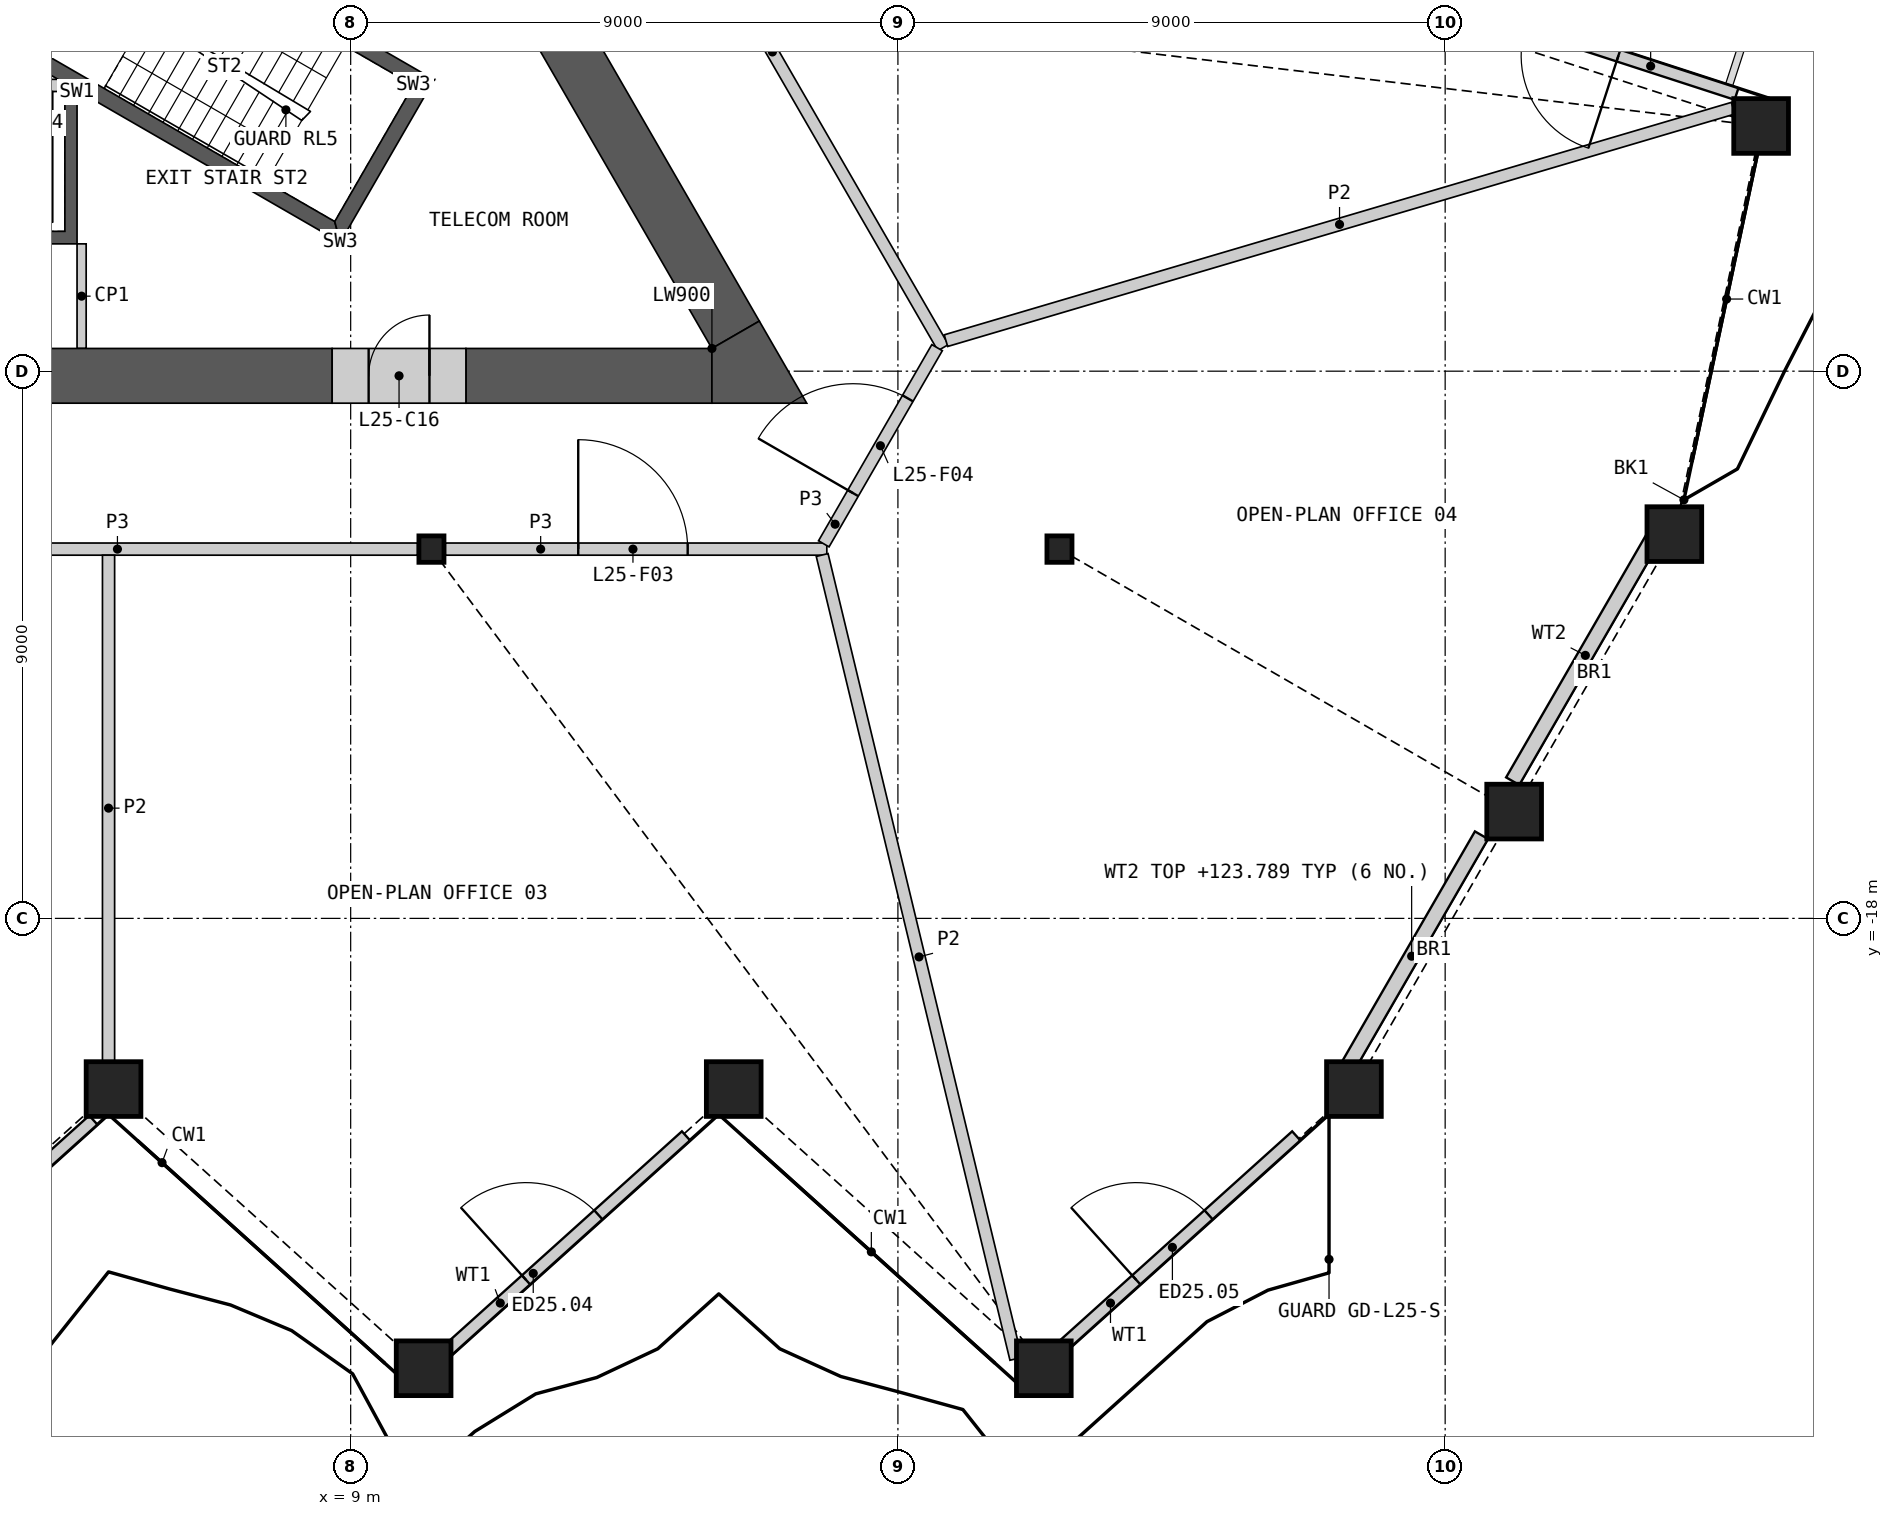
"""IFC4 building model, lengths in metres.
Left out: names, types, materials, properties, quantities, classifications, styles, units other than length and angle.
Written with IfcOpenShell. Run it as: python <this file> out.ifc"""

import sys

from ifc_helpers import new_model, si_unit, direction, frame, frame_2d, origin, origin_2d, place, context, subcontext, project, spatial, polyline, rectangle, hollow_rectangle, i_section, outline, extrude, element, fill, save


model = new_model("IFC4")
c1 = context("Model", 3, precision=1e-05, world=origin(), true_north=direction((0.0, 1.0)))
c2 = subcontext(c1, "Body", "Model", "MODEL_VIEW")
j1 = project(units=[si_unit("LENGTHUNIT", "METRE"), si_unit("PLANEANGLEUNIT", "RADIAN")], contexts=[c1])
p1 = place(None, origin())
s1 = spatial("IfcSite", under=j1, at=p1, CompositionType="ELEMENT")
p2 = place(p1, origin())
s2 = spatial("IfcBuilding", under=s1, at=p2, CompositionType="ELEMENT")
p3 = place(p2, frame((0.0, 0.0, 120.6)))
s3 = spatial("IfcBuildingStorey", under=s2, at=p3, CompositionType="ELEMENT", Elevation=120.6)
for number, where, z_axis, x_axis in (
    (1, (5.1, -20.807, 0.0), (0.0, 0.0, 1.0), (1.0, 0.0, 0.0)),
    (2, (10.2, -25.399, 0.0), (0.0, 0.0, 1.0), (1.0, 0.0, 0.0)),
    (3, (15.3, -20.807, 0.0), (0.0, 0.0, 1.0), (1.0, 0.0, 0.0)),
    (4, (20.4, -25.399, 0.0), (0.0, 0.0, 1.0), (1.0, 0.0, 0.0)),
    (5, (25.5, -20.807, 0.0), (0.0, 0.0, 1.0), (1.0, 0.0, 0.0)),
    (6, (28.135, -16.243, 0.0), (0.0, 0.0, 1.0), (1.0, 0.0, 0.0)),
    (7, (30.769, -11.68, 0.0), (0.0, 0.0, 1.0), (1.0, 0.0, 0.0)),
    (8, (32.196, -4.967, 0.0), (0.0, 0.0, 1.0), (1.0, 0.0, 0.0)),
):
    element("IfcColumn", number, at=place(p3, frame(where, z_axis=z_axis, x_axis=x_axis)), inside=s3, PredefinedType="COLUMN", context=c2, shape_type="SweptSolid", body=[
        extrude(hollow_rectangle(XDim=0.9, YDim=0.9, WallThickness=0.06, at=origin_2d()), origin(), (0.0, 0.0, 1.0), 4.2),
    ])
for number, where, z_axis, x_axis in (
    (9, (10.328, -11.926, 0.0), (0.0, 0.0, 1.0), (1.0, 0.0, 0.0)),
    (10, (20.657, -11.926, 0.0), (0.0, 0.0, 1.0), (1.0, 0.0, 0.0)),
):
    element("IfcColumn", number, at=place(p3, frame(where, z_axis=z_axis, x_axis=x_axis)), inside=s3, PredefinedType="COLUMN", context=c2, shape_type="SweptSolid", body=[
        extrude(i_section(OverallWidth=0.412, OverallDepth=0.435, WebThickness=0.036, FlangeThickness=0.057, at=origin_2d()), origin(), (0.0, 0.0, 1.0), 4.2),
    ])
p4 = place(p3, frame((0.406, -25.244, 0.0), z_axis=(0.0, 0.0, 1.0), x_axis=(0.743138997535, 0.669137078888, 0.0)))
e11 = element("IfcWall", 11, at=p4, inside=s3, PredefinedType="SOLIDWALL", context=c2, shape_type="SweptSolid", body=[
    extrude(rectangle(XDim=5.869, YDim=0.2, at=frame_2d((2.935, 0.0))), origin(), (0.0, 0.0, 1.0), 3.189),
])
p5 = place(p4, frame((1.94, 0.0, 0.0)))
e12 = element("IfcOpeningElement", 12, at=p5, cuts=e11, PredefinedType="OPENING", context=c2, shape_type="SweptSolid", body=[
    extrude(rectangle(XDim=1.6, YDim=2.4, at=frame_2d((0.8, 1.2))), frame((0.0, 0.11, 0.0), z_axis=(0.0, -1.0, 0.0), x_axis=(1.0, 0.0, 0.0)), (0.0, 0.0, 1.0), 0.22),
])
p6 = place(p3, frame((10.442, -25.244, 0.0), z_axis=(0.0, 0.0, 1.0), x_axis=(0.743134641601, 0.669141916526, 0.0)))
e13 = element("IfcWall", 13, at=p6, inside=s3, PredefinedType="SOLIDWALL", context=c2, shape_type="SweptSolid", body=[
    extrude(rectangle(XDim=5.48, YDim=0.2, at=frame_2d((2.74, 0.0))), origin(), (0.0, 0.0, 1.0), 3.189),
])
p7 = place(p6, frame((1.94, 0.0, 0.0)))
e14 = element("IfcOpeningElement", 14, at=p7, cuts=e13, PredefinedType="OPENING", context=c2, shape_type="SweptSolid", body=[
    extrude(rectangle(XDim=1.6, YDim=2.4, at=frame_2d((0.8, 1.2))), frame((0.0, 0.11, 0.0), z_axis=(0.0, -1.0, 0.0), x_axis=(1.0, 0.0, 0.0)), (0.0, 0.0, 1.0), 0.22),
])
p8 = place(p3, frame((20.478, -25.244, 0.0), z_axis=(0.0, 0.0, 1.0), x_axis=(0.743134641601, 0.669141916526, 0.0)))
e15 = element("IfcWall", 15, at=p8, inside=s3, PredefinedType="SOLIDWALL", context=c2, shape_type="SweptSolid", body=[
    extrude(rectangle(XDim=5.48, YDim=0.2, at=frame_2d((2.74, 0.0))), origin(), (0.0, 0.0, 1.0), 3.189),
])
p9 = place(p8, frame((1.94, 0.0, 0.0)))
e16 = element("IfcOpeningElement", 16, at=p9, cuts=e15, PredefinedType="OPENING", context=c2, shape_type="SweptSolid", body=[
    extrude(rectangle(XDim=1.6, YDim=2.4, at=frame_2d((0.8, 1.2))), frame((0.0, 0.11, 0.0), z_axis=(0.0, -1.0, 0.0), x_axis=(1.0, 0.0, 0.0)), (0.0, 0.0, 1.0), 0.22),
])
p10 = place(p3, frame((25.3, -20.612, 0.0), z_axis=(0.0, 0.0, 1.0), x_axis=(0.500018268964, 0.866014855936, 0.0)))
e17 = element("IfcWall", 17, at=p10, inside=s3, PredefinedType="SOLIDWALL", context=c2, shape_type="SweptSolid", body=[
    extrude(rectangle(XDim=4.596, YDim=0.25, at=frame_2d((2.298, 0.0))), origin(), (0.0, 0.0, 1.0), 3.189),
])
p11 = place(p3, frame((28.111, -15.743, 0.0), z_axis=(0.0, 0.0, 1.0), x_axis=(0.499984810975, 0.866034172995, 0.0)))
e18 = element("IfcWall", 18, at=p11, inside=s3, PredefinedType="SOLIDWALL", context=c2, shape_type="SweptSolid", body=[
    extrude(rectangle(XDim=4.78, YDim=0.25, at=frame_2d((2.39, 0.0))), origin(), (0.0, 0.0, 1.0), 3.189),
])
p12 = place(p3, frame((31.792, -4.441, 0.0), z_axis=(0.0, 0.0, 1.0), x_axis=(-0.951057028782, 0.309015417099, 0.0)))
e19 = element("IfcWall", 19, at=p12, inside=s3, PredefinedType="SOLIDWALL", context=c2, shape_type="SweptSolid", body=[
    extrude(rectangle(XDim=5.938, YDim=0.2, at=frame_2d((2.969, 0.0))), origin(), (0.0, 0.0, 1.0), 3.189),
])
p13 = place(p12, frame((2.042, 0.0, 0.0)))
e20 = element("IfcOpeningElement", 20, at=p13, cuts=e19, PredefinedType="OPENING", context=c2, shape_type="SweptSolid", body=[
    extrude(rectangle(XDim=1.6, YDim=2.4, at=frame_2d((0.8, 1.2))), frame((0.0, 0.11, 0.0), z_axis=(0.0, -1.0, 0.0), x_axis=(1.0, 0.0, 0.0)), (0.0, 0.0, 1.0), 0.22),
])
p14 = place(p3, origin())
e21 = element("IfcWall", 21, at=p14, inside=s3, PredefinedType="SHEAR", context=c2, shape_type="SweptSolid", body=[
    extrude(outline(polyline([(4.5, -4.4), (4.5, -6.906), (-4.5, -6.906), (-4.5, -4.4), (-4.3, -4.4), (-4.3, -6.7), (-2.3, -6.7), (-2.3, -4.4), (-2.1, -4.4), (-2.1, -6.7), (-0.1, -6.7), (-0.1, -4.4), (0.1, -4.4), (0.1, -6.7), (2.1, -6.7), (2.1, -4.4), (2.3, -4.4), (2.3, -6.7), (4.3, -6.7), (4.3, -4.4), (4.5, -4.4)])), origin(), (0.0, 0.0, 1.0), 3.8),
])
p15 = place(p3, frame((-4.187, -4.3, 0.0), z_axis=(0.0, 0.0, 1.0), x_axis=(1.0, 0.0, 0.0)))
e22 = element("IfcWall", 22, at=p15, inside=s3, PredefinedType="SOLIDWALL", context=c2, shape_type="SweptSolid", body=[
    extrude(rectangle(XDim=8.373, YDim=0.2, at=frame_2d((4.187, 0.0))), origin(), (0.0, 0.0, 1.0), 3.8),
])
p16 = place(p15, frame((0.287, 0.0, 0.0)))
e23 = element("IfcOpeningElement", 23, at=p16, cuts=e22, PredefinedType="OPENING", context=c2, shape_type="SweptSolid", body=[
    extrude(rectangle(XDim=1.2, YDim=2.1, at=frame_2d((0.6, 1.05))), frame((0.0, 0.11, 0.0), z_axis=(0.0, -1.0, 0.0), x_axis=(1.0, 0.0, 0.0)), (0.0, 0.0, 1.0), 0.22),
])
p17 = place(p15, frame((2.387, 0.0, 0.0)))
e24 = element("IfcOpeningElement", 24, at=p17, cuts=e22, PredefinedType="OPENING", context=c2, shape_type="SweptSolid", body=[
    extrude(rectangle(XDim=1.4, YDim=2.1, at=frame_2d((0.7, 1.05))), frame((0.0, 0.11, 0.0), z_axis=(0.0, -1.0, 0.0), x_axis=(1.0, 0.0, 0.0)), (0.0, 0.0, 1.0), 0.22),
])
p18 = place(p15, frame((4.737, 0.0, 0.0)))
e25 = element("IfcOpeningElement", 25, at=p18, cuts=e22, PredefinedType="OPENING", context=c2, shape_type="SweptSolid", body=[
    extrude(rectangle(XDim=1.1, YDim=2.1, at=frame_2d((0.55, 1.05))), frame((0.0, 0.11, 0.0), z_axis=(0.0, -1.0, 0.0), x_axis=(1.0, 0.0, 0.0)), (0.0, 0.0, 1.0), 0.22),
])
p19 = place(p15, frame((6.887, 0.0, 0.0)))
e26 = element("IfcOpeningElement", 26, at=p19, cuts=e22, PredefinedType="OPENING", context=c2, shape_type="SweptSolid", body=[
    extrude(rectangle(XDim=1.2, YDim=2.1, at=frame_2d((0.6, 1.05))), frame((0.0, 0.11, 0.0), z_axis=(0.0, -1.0, 0.0), x_axis=(1.0, 0.0, 0.0)), (0.0, 0.0, 1.0), 0.22),
])
p20 = place(p3, origin())
e27 = element("IfcWall", 27, at=p20, inside=s3, PredefinedType="SHEAR", context=c2, shape_type="SweptSolid", body=[
    extrude(outline(polyline([(3.763, -3.956), (8.83, -6.881), (8.738, -6.539), (3.888, -3.739), (3.763, -3.956)])), origin(), (0.0, 0.0, 1.0), 3.8),
])
p21 = place(p3, origin())
e28 = element("IfcWall", 28, at=p21, inside=s3, PredefinedType="SHEAR", context=c2, shape_type="SweptSolid", body=[
    extrude(outline(polyline([(8.83, -6.881), (10.374, -4.206), (10.032, -4.298), (8.738, -6.539), (8.83, -6.881)])), origin(), (0.0, 0.0, 1.0), 3.8),
])
p22 = place(p3, origin())
e29 = element("IfcWall", 29, at=p22, inside=s3, PredefinedType="SHEAR", context=c2, shape_type="SweptSolid", body=[
    extrude(outline(polyline([(10.032, -4.298), (10.374, -4.206), (5.307, -1.281), (5.182, -1.498), (10.032, -4.298)])), origin(), (0.0, 0.0, 1.0), 3.8),
])
p23 = place(p3, frame((3.655, -3.893, 0.0), z_axis=(0.0, 0.0, 1.0), x_axis=(0.499982516597, 0.866035497597, 0.0)))
e30 = element("IfcWall", 30, at=p23, inside=s3, PredefinedType="SHEAR", context=c2, shape_type="SweptSolid", body=[
    extrude(rectangle(XDim=3.088, YDim=0.25, at=frame_2d((1.544, 0.0))), origin(), (0.0, 0.0, 1.0), 3.8),
])
p24 = place(p23, frame((0.994, 0.0, 0.0)))
e31 = element("IfcOpeningElement", 31, at=p24, cuts=e30, PredefinedType="OPENING", context=c2, shape_type="SweptSolid", body=[
    extrude(rectangle(XDim=1.1, YDim=2.1, at=frame_2d((0.55, 1.05))), frame((0.0, 0.135, 0.0), z_axis=(0.0, -1.0, 0.0), x_axis=(1.0, 0.0, 0.0)), (0.0, 0.0, 1.0), 0.27),
])
p25 = place(p3, frame((4.575, -6.906, 0.0), z_axis=(0.0, 0.0, 1.0), x_axis=(0.0, -1.0, 0.0)))
e32 = element("IfcWall", 32, at=p25, inside=s3, PredefinedType="PARTITIONING", context=c2, shape_type="SweptSolid", body=[
    extrude(rectangle(XDim=1.72, YDim=0.15, at=frame_2d((0.86, 0.0))), origin(), (0.0, 0.0, 1.0), 3.8),
])
p26 = place(p3, frame((1.1, -9.076, 0.0), z_axis=(0.0, 0.0, 1.0), x_axis=(1.0, 0.0, 0.0)))
e33 = element("IfcWall", 33, at=p26, inside=s3, PredefinedType="SHEAR", context=c2, shape_type="SweptSolid", body=[
    extrude(rectangle(XDim=7.595, YDim=0.9, at=frame_2d((3.798, 0.0))), origin(), (0.0, 0.0, 1.0), 3.8),
])
p27 = place(p3, frame((10.896, -9.076, 0.0), z_axis=(0.0, 0.0, 1.0), x_axis=(1.0, 0.0, 0.0)))
e34 = element("IfcWall", 34, at=p27, inside=s3, PredefinedType="SHEAR", context=c2, shape_type="SweptSolid", body=[
    extrude(rectangle(XDim=4.046, YDim=0.9, at=frame_2d((2.023, 0.0))), origin(), (0.0, 0.0, 1.0), 3.8),
])
p28 = place(p3, frame((15.331, -8.401, 0.0), z_axis=(0.0, 0.0, 1.0), x_axis=(-0.49999216708, 0.866029926076, 0.0)))
e35 = element("IfcWall", 35, at=p28, inside=s3, PredefinedType="SHEAR", context=c2, shape_type="SweptSolid", body=[
    extrude(rectangle(XDim=12.641, YDim=0.9, at=frame_2d((6.321, 0.0))), origin(), (0.0, 0.0, 1.0), 3.8),
])
p29 = place(p3, origin())
e36 = element("IfcWall", 36, at=p29, inside=s3, PredefinedType="SHEAR", context=c2, shape_type="SweptSolid", body=[
    extrude(outline(polyline([(14.941, -8.626), (15.721, -8.176), (16.5, -9.526), (14.941, -9.526), (14.941, -8.626)])), origin(), (0.0, 0.0, 1.0), 3.8),
])
p30 = place(p3, frame((8.696, -9.076, 0.0), z_axis=(0.0, 0.0, 1.0), x_axis=(1.0, 0.0, 0.0)))
e37 = element("IfcWall", 37, at=p30, inside=s3, PredefinedType="SHEAR", context=c2, shape_type="SweptSolid", body=[
    extrude(rectangle(XDim=2.2, YDim=0.9, at=frame_2d((1.1, 0.0))), origin(), (0.0, 0.0, 1.0), 3.8),
])
p31 = place(p30, frame((0.6, 0.0, 0.0)))
e38 = element("IfcOpeningElement", 38, at=p31, cuts=e37, PredefinedType="OPENING", context=c2, shape_type="SweptSolid", body=[
    extrude(rectangle(XDim=1.0, YDim=2.1, at=frame_2d((0.5, 1.05))), frame((0.0, 0.46, 0.0), z_axis=(0.0, -1.0, 0.0), x_axis=(1.0, 0.0, 0.0)), (0.0, 0.0, 1.0), 0.92),
])
p32 = place(p3, frame((0.227, -11.926, 0.0), z_axis=(0.0, 0.0, 1.0), x_axis=(1.0, 0.0, 0.0)))
e39 = element("IfcWall", 39, at=p32, inside=s3, PredefinedType="PARTITIONING", context=c2, shape_type="SweptSolid", body=[
    extrude(rectangle(XDim=9.874, YDim=0.2, at=frame_2d((4.937, 0.0))), origin(), (0.0, 0.0, 1.0), 3.8),
])
p33 = place(p3, frame((10.556, -11.926, 0.0), z_axis=(0.0, 0.0, 1.0), x_axis=(1.0, 0.0, 0.0)))
e40 = element("IfcWall", 40, at=p33, inside=s3, PredefinedType="PARTITIONING", context=c2, shape_type="SweptSolid", body=[
    extrude(rectangle(XDim=6.275, YDim=0.2, at=frame_2d((3.137, 0.0))), origin(), (0.0, 0.0, 1.0), 3.8),
])
p34 = place(p33, frame((2.187, 0.0, 0.0)))
e41 = element("IfcOpeningElement", 41, at=p34, cuts=e40, PredefinedType="OPENING", context=c2, shape_type="SweptSolid", body=[
    extrude(rectangle(XDim=1.8, YDim=2.1, at=frame_2d((0.9, 1.05))), frame((0.0, 0.11, 0.0), z_axis=(0.0, -1.0, 0.0), x_axis=(1.0, 0.0, 0.0)), (0.0, 0.0, 1.0), 0.22),
])
p35 = place(p3, frame((15.624, -3.209, 0.0), z_axis=(0.0, 0.0, 1.0), x_axis=(0.499997920671, -0.866026604282, 0.0)))
e42 = element("IfcWall", 42, at=p35, inside=s3, PredefinedType="PARTITIONING", context=c2, shape_type="SweptSolid", body=[
    extrude(rectangle(XDim=6.24, YDim=0.2, at=frame_2d((3.12, 0.0))), origin(), (0.0, 0.0, 1.0), 3.8),
])
p36 = place(p3, frame((16.781, -11.84, 0.0), z_axis=(0.0, 0.0, 1.0), x_axis=(0.499958791762, 0.866049194065, 0.0)))
e43 = element("IfcWall", 43, at=p36, inside=s3, PredefinedType="PARTITIONING", context=c2, shape_type="SweptSolid", body=[
    extrude(rectangle(XDim=3.726, YDim=0.2, at=frame_2d((1.863, 0.0))), origin(), (0.0, 0.0, 1.0), 3.8),
])
p37 = place(p36, frame((0.963, 0.0, 0.0)))
e44 = element("IfcOpeningElement", 44, at=p37, cuts=e43, PredefinedType="OPENING", context=c2, shape_type="SweptSolid", body=[
    extrude(rectangle(XDim=1.8, YDim=2.1, at=frame_2d((0.9, 1.05))), frame((0.0, 0.11, 0.0), z_axis=(0.0, -1.0, 0.0), x_axis=(1.0, 0.0, 0.0)), (0.0, 0.0, 1.0), 0.22),
])
p38 = place(p3, frame((16.754, -12.023, 0.0), z_axis=(0.0, 0.0, 1.0), x_axis=(0.234226353532, -0.972182089586, 0.0)))
e45 = element("IfcWall", 45, at=p38, inside=s3, PredefinedType="PARTITIONING", context=c2, shape_type="SweptSolid", body=[
    extrude(rectangle(XDim=13.599, YDim=0.2, at=frame_2d((6.8, 0.0))), origin(), (0.0, 0.0, 1.0), 2.885),
])
p39 = place(p3, frame((18.79, -8.498, 0.0), z_axis=(0.0, 0.0, 1.0), x_axis=(0.959053889024, 0.283223653581, 0.0)))
e46 = element("IfcWall", 46, at=p39, inside=s3, PredefinedType="PARTITIONING", context=c2, shape_type="SweptSolid", body=[
    extrude(rectangle(XDim=13.499, YDim=0.2, at=frame_2d((6.75, 0.0))), origin(), (0.0, 0.0, 1.0), 2.885),
])
p40 = place(p3, frame((5.018, -20.347, 0.0), z_axis=(0.0, 0.0, 1.0), x_axis=(0.0, 1.0, 0.0)))
e47 = element("IfcWall", 47, at=p40, inside=s3, PredefinedType="PARTITIONING", context=c2, shape_type="SweptSolid", body=[
    extrude(rectangle(XDim=8.321, YDim=0.2, at=frame_2d((4.16, 0.0))), origin(), (0.0, 0.0, 1.0), 2.885),
])
p41 = place(p7, origin())
e48 = element("IfcDoor", 48, at=p41, inside=s3, OperationType="DOUBLE_DOOR_SINGLE_SWING", PredefinedType="DOOR", context=c2, shape_type="SweptSolid", body=[
    extrude(rectangle(XDim=1.6, YDim=2.4, at=frame_2d((0.8, 1.2))), frame((0.0, 0.025, 0.0), z_axis=(0.0, -1.0, 0.0), x_axis=(1.0, 0.0, 0.0)), (0.0, 0.0, 1.0), 0.05),
])
fill(e14, e48)
p42 = place(p9, origin())
e49 = element("IfcDoor", 49, at=p42, inside=s3, OperationType="DOUBLE_DOOR_SINGLE_SWING", PredefinedType="DOOR", context=c2, shape_type="SweptSolid", body=[
    extrude(rectangle(XDim=1.6, YDim=2.4, at=frame_2d((0.8, 1.2))), frame((0.0, 0.025, 0.0), z_axis=(0.0, -1.0, 0.0), x_axis=(1.0, 0.0, 0.0)), (0.0, 0.0, 1.0), 0.05),
])
fill(e16, e49)
p43 = place(p13, origin())
e50 = element("IfcDoor", 50, at=p43, inside=s3, OperationType="DOUBLE_DOOR_SINGLE_SWING", PredefinedType="DOOR", context=c2, shape_type="SweptSolid", body=[
    extrude(rectangle(XDim=1.6, YDim=2.4, at=frame_2d((0.8, 1.2))), frame((0.0, 0.025, 0.0), z_axis=(0.0, -1.0, 0.0), x_axis=(1.0, 0.0, 0.0)), (0.0, 0.0, 1.0), 0.05),
])
fill(e20, e50)
p44 = place(p31, origin())
e51 = element("IfcDoor", 51, at=p44, inside=s3, OperationType="SINGLE_SWING_RIGHT", PredefinedType="DOOR", context=c2, shape_type="SweptSolid", body=[
    extrude(rectangle(XDim=1.0, YDim=2.1, at=frame_2d((0.5, 1.05))), frame((0.0, 0.205, 0.0), z_axis=(0.0, -1.0, 0.0), x_axis=(1.0, 0.0, 0.0)), (0.0, 0.0, 1.0), 0.05),
])
fill(e38, e51)
p45 = place(p34, origin())
e52 = element("IfcDoor", 52, at=p45, inside=s3, OperationType="DOUBLE_DOOR_SINGLE_SWING", PredefinedType="DOOR", context=c2, shape_type="SweptSolid", body=[
    extrude(rectangle(XDim=1.8, YDim=2.1, at=frame_2d((0.9, 1.05))), frame((0.0, 0.025, 0.0), z_axis=(0.0, -1.0, 0.0), x_axis=(1.0, 0.0, 0.0)), (0.0, 0.0, 1.0), 0.05),
])
fill(e41, e52)
p46 = place(p37, origin())
e53 = element("IfcDoor", 53, at=p46, inside=s3, OperationType="DOUBLE_DOOR_SINGLE_SWING", PredefinedType="DOOR", context=c2, shape_type="SweptSolid", body=[
    extrude(rectangle(XDim=1.8, YDim=2.1, at=frame_2d((0.9, 1.05))), frame((0.0, 0.025, 0.0), z_axis=(0.0, -1.0, 0.0), x_axis=(1.0, 0.0, 0.0)), (0.0, 0.0, 1.0), 0.05),
])
fill(e44, e53)
save(model, sys.argv[1])
